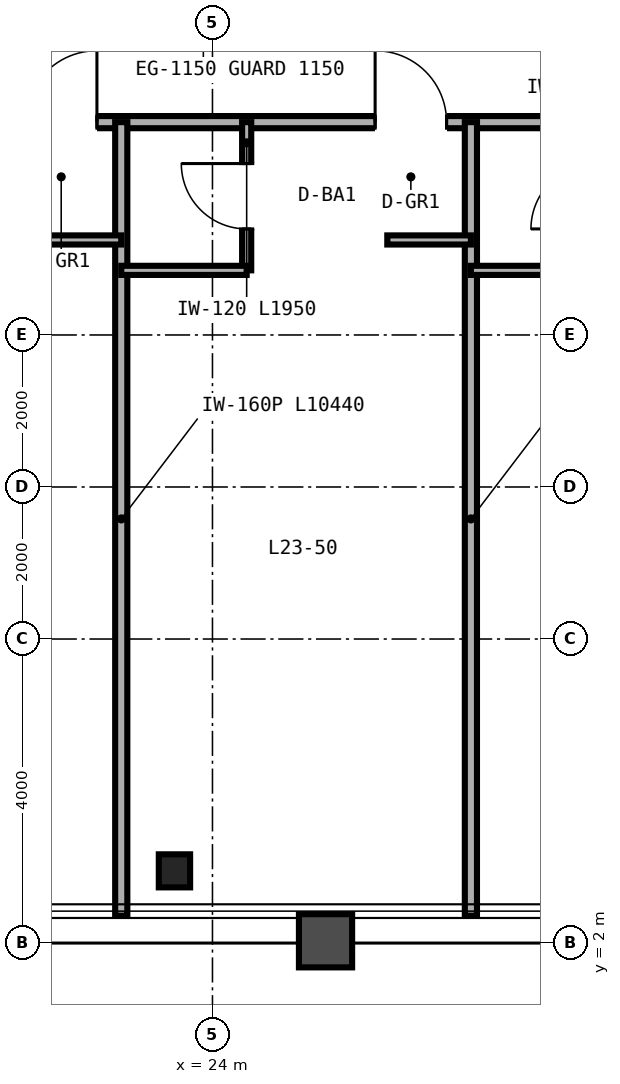
"""IFC4 building model, lengths in metres.
Left out: names, types, materials, properties, quantities, classifications, styles, units other than length and angle.
Written with IfcOpenShell. Run it as: python <this file> out.ifc"""

import sys

from ifc_helpers import new_model, si_unit, direction, frame, frame_2d, origin, origin_2d, place, context, subcontext, project, spatial, rectangle, i_section, extrude, source, transform, mapped, element, fill, save


model = new_model("IFC4")
c1 = context("Model", 3, precision=1e-05, world=origin(), true_north=direction((0.0, 1.0)))
c2 = subcontext(c1, "Body", "Model", "MODEL_VIEW")
j1 = project(units=[si_unit("LENGTHUNIT", "METRE"), si_unit("PLANEANGLEUNIT", "RADIAN")], contexts=[c1])
p1 = place(None, origin())
s1 = spatial("IfcSite", under=j1, at=p1, CompositionType="ELEMENT")
p2 = place(p1, origin())
s2 = spatial("IfcBuilding", under=s1, at=p2, CompositionType="ELEMENT")
p3 = place(p2, frame((0.0, 0.0, 97.2)))
s3 = spatial("IfcBuildingStorey", under=s2, at=p3, CompositionType="ELEMENT", Elevation=97.2)
m1 = source(origin(), c2, "Body", "SweptSolid", [
    extrude(i_section(OverallWidth=0.412, OverallDepth=0.435, WebThickness=0.036, FlangeThickness=0.057, FilletRadius=0.025, at=origin_2d()), origin(), (0.0, 0.0, 1.0), 3.36),
])
p4 = place(p3, frame((23.5, 2.95, 0.0), z_axis=(0.0, 0.0, 1.0), x_axis=(1.0, 0.0, 0.0)))
e1 = element("IfcColumn", 1, at=p4, inside=s3, PredefinedType="COLUMN", context=c2, shape_type="MappedRepresentation", body=[
    mapped(m1, transform((0.0, 0.0, 0.0), scale=1.0)),
])
p5 = place(p3, frame((14.0, 12.8, 0.0), z_axis=(0.0, 0.0, 1.0), x_axis=(1.0, 0.0, 0.0)))
e2 = element("IfcWall", 2, at=p5, inside=s3, PredefinedType="PARTITIONING", context=c2, shape_type="SweptSolid", body=[
    extrude(rectangle(XDim=36.0, YDim=0.16, at=frame_2d((18.0, 0.0))), origin(), (0.0, 0.0, 1.0), 2.581),
])
p6 = place(p5, frame((3.14, 0.0, 0.0)))
e3 = element("IfcOpeningElement", 3, at=p6, cuts=e2, PredefinedType="OPENING", context=c2, shape_type="SweptSolid", body=[
    extrude(rectangle(XDim=0.94, YDim=2.15, at=frame_2d((0.47, 1.075))), frame((0.0, 0.09, 0.0), z_axis=(0.0, -1.0, 0.0), x_axis=(1.0, 0.0, 0.0)), (0.0, 0.0, 1.0), 0.18),
])
p7 = place(p5, frame((7.54, 0.0, 0.0)))
e4 = element("IfcOpeningElement", 4, at=p7, cuts=e2, PredefinedType="OPENING", context=c2, shape_type="SweptSolid", body=[
    extrude(rectangle(XDim=0.94, YDim=2.15, at=frame_2d((0.47, 1.075))), frame((0.0, 0.09, 0.0), z_axis=(0.0, -1.0, 0.0), x_axis=(1.0, 0.0, 0.0)), (0.0, 0.0, 1.0), 0.18),
])
p8 = place(p5, frame((12.14, 0.0, 0.0)))
e5 = element("IfcOpeningElement", 5, at=p8, cuts=e2, PredefinedType="OPENING", context=c2, shape_type="SweptSolid", body=[
    extrude(rectangle(XDim=0.94, YDim=2.15, at=frame_2d((0.47, 1.075))), frame((0.0, 0.09, 0.0), z_axis=(0.0, -1.0, 0.0), x_axis=(1.0, 0.0, 0.0)), (0.0, 0.0, 1.0), 0.18),
])
p9 = place(p5, frame((16.94, 0.0, 0.0)))
e6 = element("IfcOpeningElement", 6, at=p9, cuts=e2, PredefinedType="OPENING", context=c2, shape_type="SweptSolid", body=[
    extrude(rectangle(XDim=0.94, YDim=2.15, at=frame_2d((0.47, 1.075))), frame((0.0, 0.09, 0.0), z_axis=(0.0, -1.0, 0.0), x_axis=(1.0, 0.0, 0.0)), (0.0, 0.0, 1.0), 0.18),
])
p10 = place(p5, frame((21.74, 0.0, 0.0)))
e7 = element("IfcOpeningElement", 7, at=p10, cuts=e2, PredefinedType="OPENING", context=c2, shape_type="SweptSolid", body=[
    extrude(rectangle(XDim=0.94, YDim=2.15, at=frame_2d((0.47, 1.075))), frame((0.0, 0.09, 0.0), z_axis=(0.0, -1.0, 0.0), x_axis=(1.0, 0.0, 0.0)), (0.0, 0.0, 1.0), 0.18),
])
p11 = place(p5, frame((26.34, 0.0, 0.0)))
e8 = element("IfcOpeningElement", 8, at=p11, cuts=e2, PredefinedType="OPENING", context=c2, shape_type="SweptSolid", body=[
    extrude(rectangle(XDim=0.94, YDim=2.15, at=frame_2d((0.47, 1.075))), frame((0.0, 0.09, 0.0), z_axis=(0.0, -1.0, 0.0), x_axis=(1.0, 0.0, 0.0)), (0.0, 0.0, 1.0), 0.18),
])
p12 = place(p5, frame((30.54, 0.0, 0.0)))
e9 = element("IfcOpeningElement", 9, at=p12, cuts=e2, PredefinedType="OPENING", context=c2, shape_type="SweptSolid", body=[
    extrude(rectangle(XDim=0.94, YDim=2.15, at=frame_2d((0.47, 1.075))), frame((0.0, 0.09, 0.0), z_axis=(0.0, -1.0, 0.0), x_axis=(1.0, 0.0, 0.0)), (0.0, 0.0, 1.0), 0.18),
])
p13 = place(p5, frame((34.74, 0.0, 0.0)))
e10 = element("IfcOpeningElement", 10, at=p13, cuts=e2, PredefinedType="OPENING", context=c2, shape_type="SweptSolid", body=[
    extrude(rectangle(XDim=0.94, YDim=2.15, at=frame_2d((0.47, 1.075))), frame((0.0, 0.09, 0.0), z_axis=(0.0, -1.0, 0.0), x_axis=(1.0, 0.0, 0.0)), (0.0, 0.0, 1.0), 0.18),
])
p14 = place(p3, frame((22.8, 2.36, 0.0), z_axis=(0.0, 0.0, 1.0), x_axis=(0.0, 1.0, 0.0)))
e11 = element("IfcWall", 11, at=p14, inside=s3, PredefinedType="PARTITIONING", context=c2, shape_type="SweptSolid", body=[
    extrude(rectangle(XDim=10.44, YDim=0.16, at=frame_2d((5.22, 0.0))), origin(), (0.0, 0.0, 1.0), 2.823),
])
p15 = place(p3, frame((21.7, 11.25, 0.0), z_axis=(0.0, 0.0, 1.0), x_axis=(1.0, 0.0, 0.0)))
e12 = element("IfcWall", 12, at=p15, inside=s3, PredefinedType="PARTITIONING", context=c2, shape_type="SweptSolid", body=[
    extrude(rectangle(XDim=1.1, YDim=0.12, at=frame_2d((0.55, 0.0))), origin(), (0.0, 0.0, 1.0), 3.36),
])
p16 = place(p3, frame((27.4, 2.36, 0.0), z_axis=(0.0, 0.0, 1.0), x_axis=(0.0, 1.0, 0.0)))
e13 = element("IfcWall", 13, at=p16, inside=s3, PredefinedType="PARTITIONING", context=c2, shape_type="SweptSolid", body=[
    extrude(rectangle(XDim=10.44, YDim=0.16, at=frame_2d((5.22, 0.0))), origin(), (0.0, 0.0, 1.0), 2.433),
])
p17 = place(p3, frame((24.45, 10.85, 0.0), z_axis=(0.0, 0.0, 1.0), x_axis=(0.0, 1.0, 0.0)))
e14 = element("IfcWall", 14, at=p17, inside=s3, PredefinedType="PARTITIONING", context=c2, shape_type="SweptSolid", body=[
    extrude(rectangle(XDim=1.95, YDim=0.12, at=frame_2d((0.975, 0.0))), origin(), (0.0, 0.0, 1.0), 3.36),
])
p18 = place(p17, frame((0.545, 0.0, 0.0)))
e15 = element("IfcOpeningElement", 15, at=p18, cuts=e14, PredefinedType="OPENING", context=c2, shape_type="SweptSolid", body=[
    extrude(rectangle(XDim=0.86, YDim=2.1, at=frame_2d((0.43, 1.05))), frame((0.0, 0.07, 0.0), z_axis=(0.0, -1.0, 0.0), x_axis=(1.0, 0.0, 0.0)), (0.0, 0.0, 1.0), 0.14),
])
p19 = place(p3, frame((22.8, 10.85, 0.0), z_axis=(0.0, 0.0, 1.0), x_axis=(1.0, 0.0, 0.0)))
e16 = element("IfcWall", 16, at=p19, inside=s3, PredefinedType="PARTITIONING", context=c2, shape_type="SweptSolid", body=[
    extrude(rectangle(XDim=1.65, YDim=0.12, at=frame_2d((0.825, 0.0))), origin(), (0.0, 0.0, 1.0), 2.581),
])
p20 = place(p3, frame((26.3, 11.25, 0.0), z_axis=(0.0, 0.0, 1.0), x_axis=(1.0, 0.0, 0.0)))
e17 = element("IfcWall", 17, at=p20, inside=s3, PredefinedType="PARTITIONING", context=c2, shape_type="SweptSolid", body=[
    extrude(rectangle(XDim=1.1, YDim=0.12, at=frame_2d((0.55, 0.0))), origin(), (0.0, 0.0, 1.0), 3.36),
])
p21 = place(p3, frame((27.4, 10.85, 0.0), z_axis=(0.0, 0.0, 1.0), x_axis=(1.0, 0.0, 0.0)))
e18 = element("IfcWall", 18, at=p21, inside=s3, PredefinedType="PARTITIONING", context=c2, shape_type="SweptSolid", body=[
    extrude(rectangle(XDim=1.65, YDim=0.12, at=frame_2d((0.825, 0.0))), origin(), (0.0, 0.0, 1.0), 3.36),
])
m2 = source(origin(), c2, "Body", "SweptSolid", [
    extrude(rectangle(XDim=0.86, YDim=2.1, at=frame_2d((0.43, 1.05))), frame((0.0, 0.025, 0.0), z_axis=(0.0, -1.0, 0.0), x_axis=(1.0, 0.0, 0.0)), (0.0, 0.0, 1.0), 0.05),
])
p22 = place(p18, origin())
e19 = element("IfcDoor", 19, at=p22, inside=s3, OperationType="SINGLE_SWING_RIGHT", PredefinedType="DOOR", context=c2, shape_type="MappedRepresentation", body=[
    mapped(m2, transform((0.0, 0.0, 0.0), scale=1.0)),
])
fill(e15, e19)
m3 = source(origin(), c2, "Body", "SweptSolid", [
    extrude(rectangle(XDim=0.94, YDim=2.15, at=frame_2d((0.47, 1.075))), frame((0.0, 0.025, 0.0), z_axis=(0.0, -1.0, 0.0), x_axis=(1.0, 0.0, 0.0)), (0.0, 0.0, 1.0), 0.05),
])
p23 = place(p7, origin())
e20 = element("IfcDoor", 20, at=p23, inside=s3, OperationType="SINGLE_SWING_RIGHT", PredefinedType="DOOR", context=c2, shape_type="MappedRepresentation", body=[
    mapped(m3, transform((0.0, 0.0, 0.0), scale=1.0)),
])
fill(e4, e20)
p24 = place(p8, origin())
e21 = element("IfcDoor", 21, at=p24, inside=s3, OperationType="SINGLE_SWING_LEFT", PredefinedType="DOOR", context=c2, shape_type="MappedRepresentation", body=[
    mapped(m3, transform((0.0, 0.0, 0.0), scale=1.0)),
])
fill(e5, e21)
save(model, sys.argv[1])
